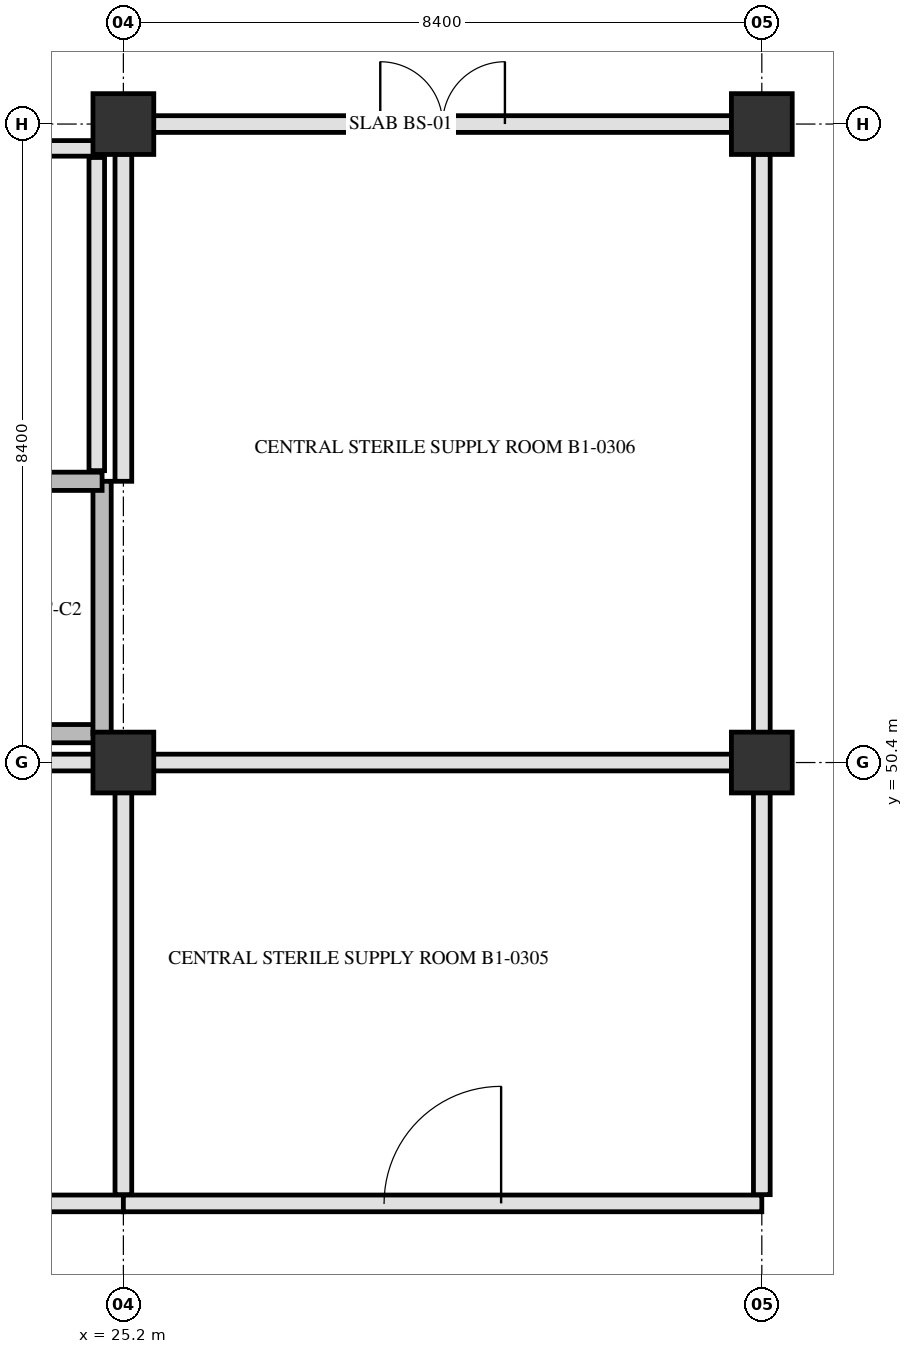
"""IFC4 building model, lengths in metres.
Left out: names, types, materials, properties, quantities, classifications, styles, units other than length and angle.
Written with IfcOpenShell. Run it as: python <this file> out.ifc"""

import sys

from ifc_helpers import new_model, si_unit, direction, frame, frame_2d, origin, origin_2d, place, context, subcontext, project, spatial, rectangle, extrude, element, fill, save


model = new_model("IFC4")
c1 = context("Model", 3, precision=1e-05, world=origin(), true_north=direction((0.0, 1.0)))
c2 = subcontext(c1, "Body", "Model", "MODEL_VIEW")
j1 = project(units=[si_unit("LENGTHUNIT", "METRE"), si_unit("PLANEANGLEUNIT", "RADIAN")], contexts=[c1])
p1 = place(None, origin())
s1 = spatial("IfcSite", under=j1, at=p1, CompositionType="ELEMENT")
p2 = place(p1, origin())
s2 = spatial("IfcBuilding", under=s1, at=p2, CompositionType="ELEMENT")
p3 = place(p2, frame((0.0, 0.0, -5.4)))
s3 = spatial("IfcBuildingStorey", under=s2, at=p3, CompositionType="ELEMENT", Elevation=-5.4)
for number, where, z_axis, x_axis in (
    (1, (25.2, 50.4, 0.0), (0.0, 0.0, 1.0), (1.0, 0.0, 0.0)),
    (2, (25.2, 58.8, 0.0), (0.0, 0.0, 1.0), (1.0, 0.0, 0.0)),
    (3, (33.6, 50.4, 0.0), (0.0, 0.0, 1.0), (1.0, 0.0, 0.0)),
    (4, (33.6, 58.8, 0.0), (0.0, 0.0, 1.0), (1.0, 0.0, 0.0)),
):
    element("IfcColumn", number, at=place(p3, frame(where, z_axis=z_axis, x_axis=x_axis)), inside=s3, PredefinedType="COLUMN", context=c2, shape_type="SweptSolid", body=[
        extrude(rectangle(XDim=0.8, YDim=0.8, at=origin_2d()), origin(), (0.0, 0.0, 1.0), 5.4),
    ])
p4 = place(p3, frame((17.1, 50.78, 0.0), z_axis=(0.0, 0.0, 1.0), x_axis=(1.0, 0.0, 0.0)))
e5 = element("IfcWall", 5, at=p4, inside=s3, PredefinedType="SHEAR", context=c2, shape_type="SweptSolid", body=[
    extrude(rectangle(XDim=7.82, YDim=0.24, at=frame_2d((3.91, 0.0))), origin(), (0.0, 0.0, 1.0), 5.08),
])
p5 = place(p3, frame((24.92, 50.78, 0.0), z_axis=(0.0, 0.0, 1.0), x_axis=(0.0, 1.0, 0.0)))
e6 = element("IfcWall", 6, at=p5, inside=s3, PredefinedType="SHEAR", context=c2, shape_type="SweptSolid", body=[
    extrude(rectangle(XDim=3.32, YDim=0.24, at=frame_2d((1.66, 0.0))), origin(), (0.0, 0.0, 1.0), 5.08),
])
p6 = place(p3, frame((17.1, 54.1, 0.0), z_axis=(0.0, 0.0, 1.0), x_axis=(1.0, 0.0, 0.0)))
e7 = element("IfcWall", 7, at=p6, inside=s3, PredefinedType="SHEAR", context=c2, shape_type="SweptSolid", body=[
    extrude(rectangle(XDim=7.82, YDim=0.24, at=frame_2d((3.91, 0.0))), origin(), (0.0, 0.0, 1.0), 5.08),
])
p7 = place(p6, frame((0.25, 0.0, 0.0)))
e8 = element("IfcOpeningElement", 8, at=p7, cuts=e7, PredefinedType="OPENING", context=c2, shape_type="SweptSolid", body=[
    extrude(rectangle(XDim=1.45, YDim=2.2, at=frame_2d((0.725, 1.1))), frame((0.0, 0.13, 0.0), z_axis=(0.0, -1.0, 0.0), x_axis=(1.0, 0.0, 0.0)), (0.0, 0.0, 1.0), 0.26),
])
p8 = place(p3, frame((24.85, 54.24, 0.0), z_axis=(0.0, 0.0, 1.0), x_axis=(0.0, 1.0, 0.0)))
e9 = element("IfcWall", 9, at=p8, inside=s3, PredefinedType="PARTITIONING", context=c2, shape_type="SweptSolid", body=[
    extrude(rectangle(XDim=4.12, YDim=0.205, at=frame_2d((2.06, 0.0))), origin(), (0.0, 0.0, 1.0), 5.07),
])
p9 = place(p3, frame((21.28, 58.48, 0.0), z_axis=(0.0, 0.0, 1.0), x_axis=(1.0, 0.0, 0.0)))
e10 = element("IfcWall", 10, at=p9, inside=s3, PredefinedType="PARTITIONING", context=c2, shape_type="SweptSolid", body=[
    extrude(rectangle(XDim=3.57, YDim=0.205, at=frame_2d((1.785, 0.0))), origin(), (0.0, 0.0, 1.0), 4.42),
])
p10 = place(p3, frame((16.8, 44.6, 0.0), z_axis=(0.0, 0.0, 1.0), x_axis=(1.0, 0.0, 0.0)))
e11 = element("IfcWall", 11, at=p10, inside=s3, PredefinedType="PARTITIONING", context=c2, shape_type="SweptSolid", body=[
    extrude(rectangle(XDim=8.4, YDim=0.22, at=frame_2d((4.2, 0.0))), origin(), (0.0, 0.0, 1.0), 4.47),
])
p11 = place(p10, frame((3.475, 0.0, 0.0)))
e12 = element("IfcOpeningElement", 12, at=p11, cuts=e11, PredefinedType="OPENING", context=c2, shape_type="SweptSolid", body=[
    extrude(rectangle(XDim=1.45, YDim=2.2, at=frame_2d((0.725, 1.1))), frame((0.0, 0.12, 0.0), z_axis=(0.0, -1.0, 0.0), x_axis=(1.0, 0.0, 0.0)), (0.0, 0.0, 1.0), 0.24),
])
p12 = place(p3, frame((25.2, 44.6, 0.0), z_axis=(0.0, 0.0, 1.0), x_axis=(1.0, 0.0, 0.0)))
e13 = element("IfcWall", 13, at=p12, inside=s3, PredefinedType="PARTITIONING", context=c2, shape_type="SweptSolid", body=[
    extrude(rectangle(XDim=8.4, YDim=0.22, at=frame_2d((4.2, 0.0))), origin(), (0.0, 0.0, 1.0), 4.47),
])
p13 = place(p12, frame((3.43, 0.0, 0.0)))
e14 = element("IfcOpeningElement", 14, at=p13, cuts=e13, PredefinedType="OPENING", context=c2, shape_type="SweptSolid", body=[
    extrude(rectangle(XDim=1.54, YDim=2.24, at=frame_2d((0.77, 1.12))), frame((0.0, 0.12, 0.0), z_axis=(0.0, -1.0, 0.0), x_axis=(1.0, 0.0, 0.0)), (0.0, 0.0, 1.0), 0.24),
])
p14 = place(p3, frame((17.195, 50.4, 0.0), z_axis=(0.0, 0.0, 1.0), x_axis=(1.0, 0.0, 0.0)))
e15 = element("IfcWall", 15, at=p14, inside=s3, PredefinedType="PARTITIONING", context=c2, shape_type="SweptSolid", body=[
    extrude(rectangle(XDim=7.61, YDim=0.22, at=frame_2d((3.805, 0.0))), origin(), (0.0, 0.0, 1.0), 4.42),
])
p15 = place(p3, frame((25.595, 50.4, 0.0), z_axis=(0.0, 0.0, 1.0), x_axis=(1.0, 0.0, 0.0)))
e16 = element("IfcWall", 16, at=p15, inside=s3, PredefinedType="PARTITIONING", context=c2, shape_type="SweptSolid", body=[
    extrude(rectangle(XDim=7.61, YDim=0.22, at=frame_2d((3.805, 0.0))), origin(), (0.0, 0.0, 1.0), 4.42),
])
p16 = place(p3, frame((25.595, 58.8, 0.0), z_axis=(0.0, 0.0, 1.0), x_axis=(1.0, 0.0, 0.0)))
e17 = element("IfcWall", 17, at=p16, inside=s3, PredefinedType="PARTITIONING", context=c2, shape_type="SweptSolid", body=[
    extrude(rectangle(XDim=7.61, YDim=0.22, at=frame_2d((3.805, 0.0))), origin(), (0.0, 0.0, 1.0), 4.42),
])
p17 = place(p16, frame((2.985, 0.0, 0.0)))
e18 = element("IfcOpeningElement", 18, at=p17, cuts=e17, PredefinedType="OPENING", context=c2, shape_type="SweptSolid", body=[
    extrude(rectangle(XDim=1.64, YDim=2.28, at=frame_2d((0.82, 1.14))), frame((0.0, 0.12, 0.0), z_axis=(0.0, -1.0, 0.0), x_axis=(1.0, 0.0, 0.0)), (0.0, 0.0, 1.0), 0.24),
])
p18 = place(p3, frame((25.2, 44.715, 0.0), z_axis=(0.0, 0.0, 1.0), x_axis=(0.0, 1.0, 0.0)))
e19 = element("IfcWall", 19, at=p18, inside=s3, PredefinedType="PARTITIONING", context=c2, shape_type="SweptSolid", body=[
    extrude(rectangle(XDim=5.29, YDim=0.22, at=frame_2d((2.645, 0.0))), origin(), (0.0, 0.0, 1.0), 4.47),
])
p19 = place(p3, frame((25.2, 54.1, 0.0), z_axis=(0.0, 0.0, 1.0), x_axis=(0.0, 1.0, 0.0)))
e20 = element("IfcWall", 20, at=p19, inside=s3, PredefinedType="PARTITIONING", context=c2, shape_type="SweptSolid", body=[
    extrude(rectangle(XDim=4.305, YDim=0.22, at=frame_2d((2.152, 0.0))), origin(), (0.0, 0.0, 1.0), 4.47),
])
p20 = place(p3, frame((33.6, 44.715, 0.0), z_axis=(0.0, 0.0, 1.0), x_axis=(0.0, 1.0, 0.0)))
e21 = element("IfcWall", 21, at=p20, inside=s3, PredefinedType="PARTITIONING", context=c2, shape_type="SweptSolid", body=[
    extrude(rectangle(XDim=5.29, YDim=0.22, at=frame_2d((2.645, 0.0))), origin(), (0.0, 0.0, 1.0), 4.47),
])
p21 = place(p3, frame((33.6, 50.795, 0.0), z_axis=(0.0, 0.0, 1.0), x_axis=(0.0, 1.0, 0.0)))
e22 = element("IfcWall", 22, at=p21, inside=s3, PredefinedType="PARTITIONING", context=c2, shape_type="SweptSolid", body=[
    extrude(rectangle(XDim=7.61, YDim=0.22, at=frame_2d((3.805, 0.0))), origin(), (0.0, 0.0, 1.0), 4.47),
])
p22 = place(p13, origin())
e23 = element("IfcDoor", 23, at=p22, inside=s3, OperationType="SINGLE_SWING_RIGHT", PredefinedType="DOOR", context=c2, shape_type="SweptSolid", body=[
    extrude(rectangle(XDim=1.54, YDim=2.24, at=frame_2d((0.77, 1.12))), frame((0.0, 0.025, 0.0), z_axis=(0.0, -1.0, 0.0), x_axis=(1.0, 0.0, 0.0)), (0.0, 0.0, 1.0), 0.05),
])
fill(e14, e23)
p23 = place(p17, origin())
e24 = element("IfcDoor", 24, at=p23, inside=s3, OperationType="DOUBLE_SWING_LEFT", PredefinedType="DOOR", context=c2, shape_type="SweptSolid", body=[
    extrude(rectangle(XDim=1.64, YDim=2.28, at=frame_2d((0.82, 1.14))), frame((0.0, 0.025, 0.0), z_axis=(0.0, -1.0, 0.0), x_axis=(1.0, 0.0, 0.0)), (0.0, 0.0, 1.0), 0.05),
])
fill(e18, e24)
save(model, sys.argv[1])
